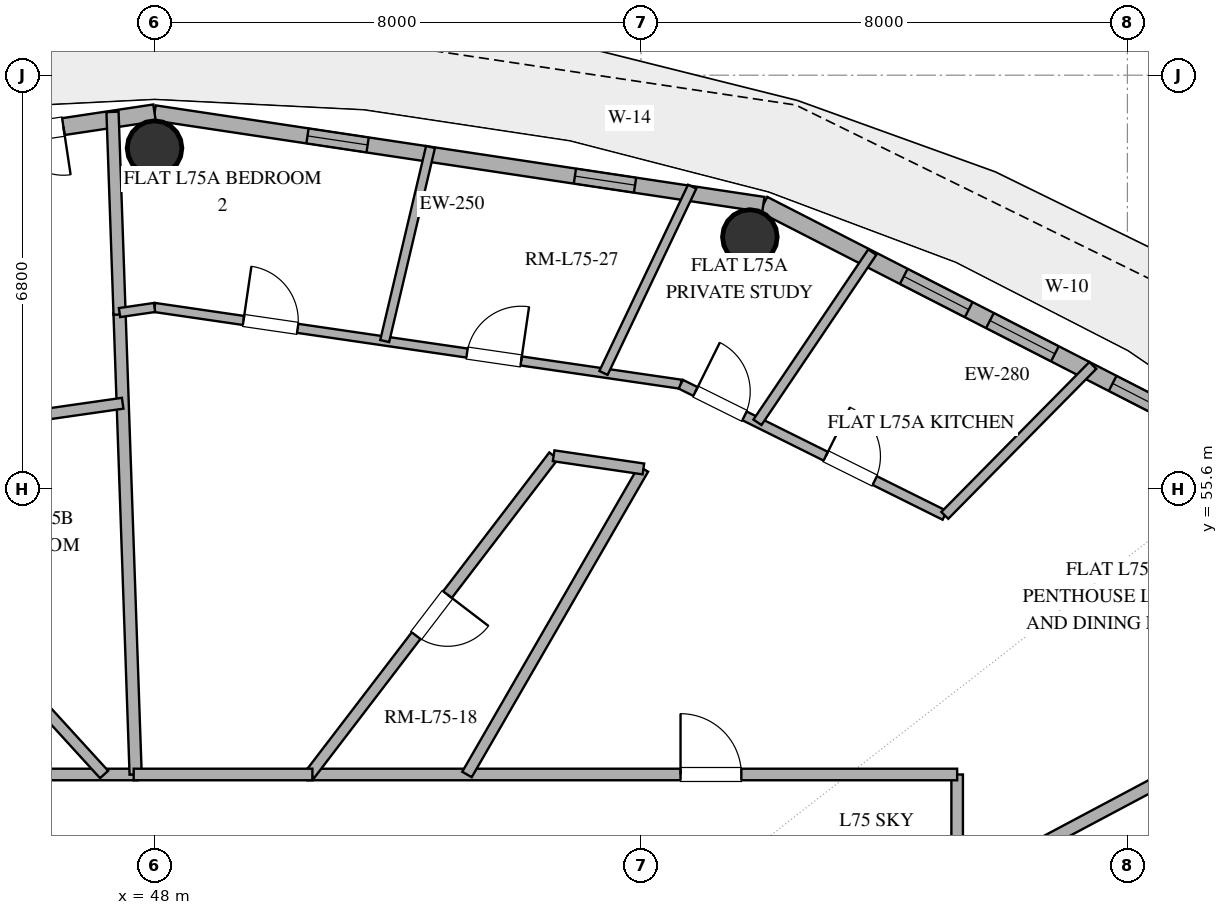
"""IFC4 building model, lengths in metres.
Left out: names, types, materials, properties, quantities, classifications, styles, units other than length and angle.
Written with IfcOpenShell. Run it as: python <this file> out.ifc"""

import sys

from ifc_helpers import new_model, si_unit, direction, frame, frame_2d, origin, origin_2d, place, context, subcontext, project, spatial, rectangle, hollow_circle, extrude, element, fill, save


model = new_model("IFC4")
c1 = context("Model", 3, precision=1e-05, world=origin(), true_north=direction((0.0, 1.0)))
c2 = subcontext(c1, "Body", "Model", "MODEL_VIEW")
j1 = project(units=[si_unit("LENGTHUNIT", "METRE"), si_unit("PLANEANGLEUNIT", "RADIAN")], contexts=[c1])
p1 = place(None, origin())
s1 = spatial("IfcSite", under=j1, at=p1, CompositionType="ELEMENT")
p2 = place(p1, origin())
s2 = spatial("IfcBuilding", under=s1, at=p2, CompositionType="ELEMENT")
p3 = place(p2, frame((0.0, 0.0, 291.0)))
s3 = spatial("IfcBuildingStorey", under=s2, at=p3, CompositionType="ELEMENT", Elevation=291.0)
for number, where, z_axis, x_axis in (
    (1, (57.791, 59.739, 0.0), (0.0, 0.0, 1.0), (1.0, 0.0, 0.0)),
    (2, (48.0, 61.2, 0.0), (0.0, 0.0, 1.0), (1.0, 0.0, 0.0)),
):
    element("IfcColumn", number, at=place(p3, frame(where, z_axis=z_axis, x_axis=x_axis)), inside=s3, PredefinedType="COLUMN", context=c2, shape_type="SweptSolid", body=[
        extrude(hollow_circle(Radius=0.45, WallThickness=0.025, at=origin_2d()), origin(), (0.0, 0.0, 1.0), 3.37),
    ])
p4 = place(p3, frame((66.383, 55.987, 0.0), z_axis=(0.0, 0.0, 1.0), x_axis=(-0.890007394051, 0.455946091699, 0.0)))
e3 = element("IfcWall", 3, at=p4, inside=s3, PredefinedType="SOLIDWALL", context=c2, shape_type="SweptSolid", body=[
    extrude(rectangle(XDim=9.404, YDim=0.28, at=frame_2d((4.702, 0.0))), origin(), (0.0, 0.0, 1.0), 3.37),
])
p5 = place(p4, frame((1.75, 0.0, 0.85)))
e4 = element("IfcOpeningElement", 4, at=p5, cuts=e3, PredefinedType="OPENING", context=c2, shape_type="SweptSolid", body=[
    extrude(rectangle(XDim=1.2, YDim=1.8, at=frame_2d((0.6, 0.9))), frame((0.0, 0.15, 0.0), z_axis=(0.0, -1.0, 0.0), x_axis=(1.0, 0.0, 0.0)), (0.0, 0.0, 1.0), 0.3),
])
p6 = place(p4, frame((4.017, 0.0, 0.85)))
e5 = element("IfcOpeningElement", 5, at=p6, cuts=e3, PredefinedType="OPENING", context=c2, shape_type="SweptSolid", body=[
    extrude(rectangle(XDim=1.2, YDim=1.6, at=frame_2d((0.6, 0.8))), frame((0.0, 0.15, 0.0), z_axis=(0.0, -1.0, 0.0), x_axis=(1.0, 0.0, 0.0)), (0.0, 0.0, 1.0), 0.3),
])
p7 = place(p4, frame((5.609, 0.0, 0.85)))
e6 = element("IfcOpeningElement", 6, at=p7, cuts=e3, PredefinedType="OPENING", context=c2, shape_type="SweptSolid", body=[
    extrude(rectangle(XDim=1.2, YDim=1.6, at=frame_2d((0.6, 0.8))), frame((0.0, 0.15, 0.0), z_axis=(0.0, -1.0, 0.0), x_axis=(1.0, 0.0, 0.0)), (0.0, 0.0, 1.0), 0.3),
])
p8 = place(p3, frame((58.013, 60.274, 0.0), z_axis=(0.0, 0.0, 1.0), x_axis=(-0.988882522213, 0.148698881169, 0.0)))
e7 = element("IfcWall", 7, at=p8, inside=s3, PredefinedType="SOLIDWALL", context=c2, shape_type="SweptSolid", body=[
    extrude(rectangle(XDim=10.125, YDim=0.25, at=frame_2d((5.062, 0.0))), origin(), (0.0, 0.0, 1.0), 3.37),
])
p9 = place(p8, frame((2.134, 0.0, 0.35)))
e8 = element("IfcOpeningElement", 8, at=p9, cuts=e7, PredefinedType="OPENING", context=c2, shape_type="SweptSolid", body=[
    extrude(rectangle(XDim=1.0, YDim=1.05, at=frame_2d((0.5, 0.525))), frame((0.0, 0.135, 0.0), z_axis=(0.0, -1.0, 0.0), x_axis=(1.0, 0.0, 0.0)), (0.0, 0.0, 1.0), 0.27),
])
p10 = place(p8, frame((6.582, 0.0, 1.42)))
e9 = element("IfcOpeningElement", 9, at=p10, cuts=e7, PredefinedType="OPENING", context=c2, shape_type="SweptSolid", body=[
    extrude(rectangle(XDim=1.0, YDim=1.05, at=frame_2d((0.5, 0.525))), frame((0.0, 0.135, 0.0), z_axis=(0.0, -1.0, 0.0), x_axis=(1.0, 0.0, 0.0)), (0.0, 0.0, 1.0), 0.27),
])
p11 = place(p3, frame((48.0, 61.78, 0.0), z_axis=(0.0, 0.0, 1.0), x_axis=(-0.988882522213, -0.148698881169, 0.0)))
e10 = element("IfcWall", 10, at=p11, inside=s3, PredefinedType="SOLIDWALL", context=c2, shape_type="SweptSolid", body=[
    extrude(rectangle(XDim=10.125, YDim=0.28, at=frame_2d((5.062, 0.0))), origin(), (0.0, 0.0, 1.0), 3.37),
])
p12 = place(p11, frame((1.516, 0.0, 0.0)))
e11 = element("IfcOpeningElement", 11, at=p12, cuts=e10, PredefinedType="OPENING", context=c2, shape_type="SweptSolid", body=[
    extrude(rectangle(XDim=1.6, YDim=2.25, at=frame_2d((0.8, 1.125))), frame((0.0, 0.15, 0.0), z_axis=(0.0, -1.0, 0.0), x_axis=(1.0, 0.0, 0.0)), (0.0, 0.0, 1.0), 0.3),
])
p13 = place(p3, frame((61.2, 50.9, 0.0), z_axis=(0.0, 0.0, 1.0), x_axis=(0.0, -1.0, 0.0)))
e12 = element("IfcWall", 12, at=p13, inside=s3, PredefinedType="PARTITIONING", context=c2, shape_type="SweptSolid", body=[
    extrude(rectangle(XDim=16.9, YDim=0.19, at=frame_2d((8.45, 0.0))), origin(), (0.0, 0.0, 1.0), 2.73),
])
p14 = place(p13, frame((8.873, 0.0, 0.0)))
e13 = element("IfcOpeningElement", 13, at=p14, cuts=e12, PredefinedType="OPENING", context=c2, shape_type="SweptSolid", body=[
    extrude(rectangle(XDim=1.0, YDim=2.2, at=frame_2d((0.5, 1.1))), frame((0.0, 0.105, 0.0), z_axis=(0.0, -1.0, 0.0), x_axis=(1.0, 0.0, 0.0)), (0.0, 0.0, 1.0), 0.21),
])
p15 = place(p3, frame((34.8, 50.9, 0.0), z_axis=(0.0, 0.0, 1.0), x_axis=(1.0, 0.0, 0.0)))
e14 = element("IfcWall", 14, at=p15, inside=s3, PredefinedType="PARTITIONING", context=c2, shape_type="SweptSolid", body=[
    extrude(rectangle(XDim=12.921, YDim=0.19, at=frame_2d((6.46, 0.0))), origin(), (0.0, 0.0, 1.0), 2.73),
])
p16 = place(p15, frame((5.707, 0.0, 0.0)))
e15 = element("IfcOpeningElement", 15, at=p16, cuts=e14, PredefinedType="OPENING", context=c2, shape_type="SweptSolid", body=[
    extrude(rectangle(XDim=1.0, YDim=2.2, at=frame_2d((0.5, 1.1))), frame((0.0, 0.105, 0.0), z_axis=(0.0, -1.0, 0.0), x_axis=(1.0, 0.0, 0.0)), (0.0, 0.0, 1.0), 0.21),
])
p17 = place(p3, frame((50.515, 50.9, 0.0), z_axis=(0.0, 0.0, 1.0), x_axis=(1.0, 0.0, 0.0)))
e16 = element("IfcWall", 16, at=p17, inside=s3, PredefinedType="PARTITIONING", context=c2, shape_type="SweptSolid", body=[
    extrude(rectangle(XDim=10.685, YDim=0.19, at=frame_2d((5.342, 0.0))), origin(), (0.0, 0.0, 1.0), 2.73),
])
p18 = place(p17, frame((6.135, 0.0, 0.0)))
e17 = element("IfcOpeningElement", 17, at=p18, cuts=e16, PredefinedType="OPENING", context=c2, shape_type="SweptSolid", body=[
    extrude(rectangle(XDim=1.0, YDim=2.2, at=frame_2d((0.5, 1.1))), frame((0.0, 0.105, 0.0), z_axis=(0.0, -1.0, 0.0), x_axis=(1.0, 0.0, 0.0)), (0.0, 0.0, 1.0), 0.21),
])
p19 = place(p3, frame((42.278, 56.261, 0.0), z_axis=(0.0, 0.0, 1.0), x_axis=(0.674096276867, -0.73864349284, 0.0)))
e18 = element("IfcWall", 18, at=p19, inside=s3, PredefinedType="PLUMBINGWALL", context=c2, shape_type="SweptSolid", body=[
    extrude(rectangle(XDim=7.258, YDim=0.18, at=frame_2d((3.629, 0.0))), origin(), (0.0, 0.0, 1.0), 2.73),
])
p20 = place(p19, frame((3.204, 0.0, 0.0)))
e19 = element("IfcOpeningElement", 19, at=p20, cuts=e18, PredefinedType="OPENING", context=c2, shape_type="SweptSolid", body=[
    extrude(rectangle(XDim=0.85, YDim=2.1, at=frame_2d((0.425, 1.05))), frame((0.0, 0.1, 0.0), z_axis=(0.0, -1.0, 0.0), x_axis=(1.0, 0.0, 0.0)), (0.0, 0.0, 1.0), 0.2),
])
p21 = place(p3, frame((54.564, 56.141, 0.0), z_axis=(0.0, 0.0, 1.0), x_axis=(-0.607456974677, -0.794352581614, 0.0)))
e20 = element("IfcWall", 20, at=p21, inside=s3, PredefinedType="PLUMBINGWALL", context=c2, shape_type="SweptSolid", body=[
    extrude(rectangle(XDim=6.598, YDim=0.18, at=frame_2d((3.299, 0.0))), origin(), (0.0, 0.0, 1.0), 2.73),
])
p22 = place(p21, frame((2.874, 0.0, 0.0)))
e21 = element("IfcOpeningElement", 21, at=p22, cuts=e20, PredefinedType="OPENING", context=c2, shape_type="SweptSolid", body=[
    extrude(rectangle(XDim=0.85, YDim=2.1, at=frame_2d((0.425, 1.05))), frame((0.0, 0.1, 0.0), z_axis=(0.0, -1.0, 0.0), x_axis=(1.0, 0.0, 0.0)), (0.0, 0.0, 1.0), 0.2),
])
p23 = place(p3, frame((47.689, 50.9, 0.0), z_axis=(0.0, 0.0, 1.0), x_axis=(-0.034882659784, 0.999391414835, 0.0)))
e22 = element("IfcWall", 22, at=p23, inside=s3, PredefinedType="PARTITIONING", context=c2, shape_type="SweptSolid", body=[
    extrude(rectangle(XDim=7.601, YDim=0.2, at=frame_2d((3.8, 0.0))), origin(), (0.0, 0.0, 1.0), 2.73),
])
p24 = place(p3, frame((53.138, 50.9, 0.0), z_axis=(0.0, 0.0, 1.0), x_axis=(0.499985927882, 0.866033528173, 0.0)))
e23 = element("IfcWall", 23, at=p24, inside=s3, PredefinedType="PLUMBINGWALL", context=c2, shape_type="SweptSolid", body=[
    extrude(rectangle(XDim=5.802, YDim=0.18, at=frame_2d((2.901, 0.0))), origin(), (0.0, 0.0, 1.0), 2.73),
])
p25 = place(p3, frame((68.909, 53.118, 0.0), z_axis=(0.0, 0.0, 1.0), x_axis=(-0.882939716422, -0.469486375909, 0.0)))
e24 = element("IfcWall", 24, at=p25, inside=s3, PredefinedType="PARTITIONING", context=c2, shape_type="SweptSolid", body=[
    extrude(rectangle(XDim=8.732, YDim=0.2, at=frame_2d((4.366, 0.0))), origin(), (0.0, 0.0, 1.0), 2.73),
])
p26 = place(p3, frame((47.476, 57.005, 0.0), z_axis=(0.0, 0.0, 1.0), x_axis=(-0.989922511169, -0.141610105153, 0.0)))
e25 = element("IfcWall", 25, at=p26, inside=s3, PredefinedType="PLUMBINGWALL", context=c2, shape_type="SweptSolid", body=[
    extrude(rectangle(XDim=5.251, YDim=0.18, at=frame_2d((2.626, 0.0))), origin(), (0.0, 0.0, 1.0), 2.73),
])
p27 = place(p3, frame((48.0, 58.58, 0.0), z_axis=(0.0, 0.0, 1.0), x_axis=(0.989536136377, -0.144285254977, 0.0)))
e26 = element("IfcWall", 26, at=p27, inside=s3, PredefinedType="PARTITIONING", context=c2, shape_type="SweptSolid", body=[
    extrude(rectangle(XDim=8.746, YDim=0.15, at=frame_2d((4.373, 0.0))), origin(), (0.0, 0.0, 1.0), 2.73),
])
p28 = place(p27, frame((1.479, 0.0, 0.0)))
e27 = element("IfcOpeningElement", 27, at=p28, cuts=e26, PredefinedType="OPENING", context=c2, shape_type="SweptSolid", body=[
    extrude(rectangle(XDim=0.9, YDim=2.1, at=frame_2d((0.45, 1.05))), frame((0.0, 0.085, 0.0), z_axis=(0.0, -1.0, 0.0), x_axis=(1.0, 0.0, 0.0)), (0.0, 0.0, 1.0), 0.17),
])
p29 = place(p27, frame((5.193, 0.0, 0.0)))
e28 = element("IfcOpeningElement", 28, at=p29, cuts=e26, PredefinedType="OPENING", context=c2, shape_type="SweptSolid", body=[
    extrude(rectangle(XDim=0.9, YDim=2.1, at=frame_2d((0.45, 1.05))), frame((0.0, 0.085, 0.0), z_axis=(0.0, -1.0, 0.0), x_axis=(1.0, 0.0, 0.0)), (0.0, 0.0, 1.0), 0.17),
])
p30 = place(p3, frame((56.655, 57.318, 0.0), z_axis=(0.0, 0.0, 1.0), x_axis=(0.895572412961, -0.44491578208, 0.0)))
e29 = element("IfcWall", 29, at=p30, inside=s3, PredefinedType="PLUMBINGWALL", context=c2, shape_type="SweptSolid", body=[
    extrude(rectangle(XDim=4.848, YDim=0.16, at=frame_2d((2.424, 0.0))), origin(), (0.0, 0.0, 1.0), 2.73),
])
p31 = place(p30, frame((2.662, 0.0, 0.0)))
e30 = element("IfcOpeningElement", 30, at=p31, cuts=e29, PredefinedType="OPENING", context=c2, shape_type="SweptSolid", body=[
    extrude(rectangle(XDim=0.9, YDim=2.1, at=frame_2d((0.45, 1.05))), frame((0.0, 0.09, 0.0), z_axis=(0.0, -1.0, 0.0), x_axis=(1.0, 0.0, 0.0)), (0.0, 0.0, 1.0), 0.18),
])
p32 = place(p30, frame((0.27, 0.0, 0.0)))
e31 = element("IfcOpeningElement", 31, at=p32, cuts=e29, PredefinedType="OPENING", context=c2, shape_type="SweptSolid", body=[
    extrude(rectangle(XDim=0.9, YDim=2.1, at=frame_2d((0.45, 1.05))), frame((0.0, 0.09, 0.0), z_axis=(0.0, -1.0, 0.0), x_axis=(1.0, 0.0, 0.0)), (0.0, 0.0, 1.0), 0.18),
])
p33 = place(p3, frame((60.997, 55.161, 0.0), z_axis=(0.0, 0.0, 1.0), x_axis=(0.702618919802, 0.711566338113, 0.0)))
e32 = element("IfcWall", 32, at=p33, inside=s3, PredefinedType="PLUMBINGWALL", context=c2, shape_type="SweptSolid", body=[
    extrude(rectangle(XDim=3.465, YDim=0.16, at=frame_2d((1.733, 0.0))), origin(), (0.0, 0.0, 1.0), 2.73),
])
p34 = place(p3, frame((56.842, 60.566, 0.0), z_axis=(0.0, 0.0, 1.0), x_axis=(-0.429975480416, -0.902840565239, 0.0)))
e33 = element("IfcWall", 33, at=p34, inside=s3, PredefinedType="PARTITIONING", context=c2, shape_type="SweptSolid", body=[
    extrude(rectangle(XDim=3.393, YDim=0.15, at=frame_2d((1.696, 0.0))), origin(), (0.0, 0.0, 1.0), 2.73),
])
p35 = place(p3, frame((59.804, 59.49, 0.0), z_axis=(0.0, 0.0, 1.0), x_axis=(-0.559397095435, -0.828899806743, 0.0)))
e34 = element("IfcWall", 34, at=p35, inside=s3, PredefinedType="PLUMBINGWALL", context=c2, shape_type="SweptSolid", body=[
    extrude(rectangle(XDim=3.376, YDim=0.16, at=frame_2d((1.688, 0.0))), origin(), (0.0, 0.0, 1.0), 2.73),
])
p36 = place(p3, frame((47.309, 61.797, 0.0), z_axis=(0.0, 0.0, 1.0), x_axis=(0.034921182562, -0.999390069497, 0.0)))
e35 = element("IfcWall", 35, at=p36, inside=s3, PredefinedType="PARTITIONING", context=c2, shape_type="SweptSolid", body=[
    extrude(rectangle(XDim=3.335, YDim=0.2, at=frame_2d((1.667, 0.0))), origin(), (0.0, 0.0, 1.0), 2.73),
])
p37 = place(p3, frame((51.785, 58.028, 0.0), z_axis=(0.0, 0.0, 1.0), x_axis=(0.2298279545, 0.973231273301, 0.0)))
e36 = element("IfcWall", 36, at=p37, inside=s3, PredefinedType="PARTITIONING", context=c2, shape_type="SweptSolid", body=[
    extrude(rectangle(XDim=3.278, YDim=0.15, at=frame_2d((1.639, 0.0))), origin(), (0.0, 0.0, 1.0), 2.73),
])
p38 = place(p3, frame((47.657, 50.9, 0.0), z_axis=(0.0, 0.0, 1.0), x_axis=(1.0, 0.0, 0.0)))
e37 = element("IfcWall", 37, at=p38, inside=s3, PredefinedType="PARTITIONING", context=c2, shape_type="SweptSolid", body=[
    extrude(rectangle(XDim=2.939, YDim=0.19, at=frame_2d((1.469, 0.0))), origin(), (0.0, 0.0, 1.0), 2.73),
])
p39 = place(p3, frame((56.039, 55.925, 0.0), z_axis=(0.0, 0.0, 1.0), x_axis=(-0.989402061703, 0.14520179165, 0.0)))
e38 = element("IfcWall", 38, at=p39, inside=s3, PredefinedType="PLUMBINGWALL", context=c2, shape_type="SweptSolid", body=[
    extrude(rectangle(XDim=1.491, YDim=0.18, at=frame_2d((0.746, 0.0))), origin(), (0.0, 0.0, 1.0), 2.73),
])
p40 = place(p3, frame((47.424, 58.496, 0.0), z_axis=(0.0, 0.0, 1.0), x_axis=(0.989534228924, 0.144298336053, 0.0)))
e39 = element("IfcWall", 39, at=p40, inside=s3, PredefinedType="PARTITIONING", context=c2, shape_type="SweptSolid", body=[
    extrude(rectangle(XDim=0.582, YDim=0.15, at=frame_2d((0.291, 0.0))), origin(), (0.0, 0.0, 1.0), 2.73),
])
p41 = place(p5, origin())
e40 = element("IfcWindow", 40, at=p41, inside=s3, PartitioningType="SINGLE_PANEL", PredefinedType="WINDOW", context=c2, shape_type="SweptSolid", body=[
    extrude(rectangle(XDim=1.2, YDim=1.8, at=frame_2d((0.6, 0.9))), frame((0.0, 0.03, 0.0), z_axis=(0.0, -1.0, 0.0), x_axis=(1.0, 0.0, 0.0)), (0.0, 0.0, 1.0), 0.06),
])
fill(e4, e40)
p42 = place(p6, origin())
e41 = element("IfcWindow", 41, at=p42, inside=s3, PartitioningType="SINGLE_PANEL", PredefinedType="WINDOW", context=c2, shape_type="SweptSolid", body=[
    extrude(rectangle(XDim=1.2, YDim=1.6, at=frame_2d((0.6, 0.8))), frame((0.0, 0.03, 0.0), z_axis=(0.0, -1.0, 0.0), x_axis=(1.0, 0.0, 0.0)), (0.0, 0.0, 1.0), 0.06),
])
fill(e5, e41)
p43 = place(p7, origin())
e42 = element("IfcWindow", 42, at=p43, inside=s3, PartitioningType="SINGLE_PANEL", PredefinedType="WINDOW", context=c2, shape_type="SweptSolid", body=[
    extrude(rectangle(XDim=1.2, YDim=1.6, at=frame_2d((0.6, 0.8))), frame((0.0, 0.03, 0.0), z_axis=(0.0, -1.0, 0.0), x_axis=(1.0, 0.0, 0.0)), (0.0, 0.0, 1.0), 0.06),
])
fill(e6, e42)
p44 = place(p12, origin())
e43 = element("IfcDoor", 43, at=p44, inside=s3, OperationType="DOUBLE_DOOR_SINGLE_SWING", PredefinedType="DOOR", context=c2, shape_type="SweptSolid", body=[
    extrude(rectangle(XDim=1.6, YDim=2.25, at=frame_2d((0.8, 1.125))), frame((0.0, 0.025, 0.0), z_axis=(0.0, -1.0, 0.0), x_axis=(1.0, 0.0, 0.0)), (0.0, 0.0, 1.0), 0.05),
])
fill(e11, e43)
p45 = place(p9, origin())
e44 = element("IfcWindow", 44, at=p45, inside=s3, PartitioningType="SINGLE_PANEL", PredefinedType="WINDOW", context=c2, shape_type="SweptSolid", body=[
    extrude(rectangle(XDim=1.0, YDim=1.05, at=frame_2d((0.5, 0.525))), frame((0.0, 0.03, 0.0), z_axis=(0.0, -1.0, 0.0), x_axis=(1.0, 0.0, 0.0)), (0.0, 0.0, 1.0), 0.06),
])
fill(e8, e44)
p46 = place(p10, origin())
e45 = element("IfcWindow", 45, at=p46, inside=s3, PartitioningType="SINGLE_PANEL", PredefinedType="WINDOW", context=c2, shape_type="SweptSolid", body=[
    extrude(rectangle(XDim=1.0, YDim=1.05, at=frame_2d((0.5, 0.525))), frame((0.0, 0.03, 0.0), z_axis=(0.0, -1.0, 0.0), x_axis=(1.0, 0.0, 0.0)), (0.0, 0.0, 1.0), 0.06),
])
fill(e9, e45)
p47 = place(p18, origin())
e46 = element("IfcDoor", 46, at=p47, inside=s3, OperationType="SINGLE_SWING_LEFT", PredefinedType="DOOR", context=c2, shape_type="SweptSolid", body=[
    extrude(rectangle(XDim=1.0, YDim=2.2, at=frame_2d((0.5, 1.1))), frame((0.0, 0.025, 0.0), z_axis=(0.0, -1.0, 0.0), x_axis=(1.0, 0.0, 0.0)), (0.0, 0.0, 1.0), 0.05),
])
fill(e17, e46)
p48 = place(p22, origin())
e47 = element("IfcDoor", 47, at=p48, inside=s3, OperationType="SINGLE_SWING_LEFT", PredefinedType="DOOR", context=c2, shape_type="SweptSolid", body=[
    extrude(rectangle(XDim=0.85, YDim=2.1, at=frame_2d((0.425, 1.05))), frame((0.0, 0.025, 0.0), z_axis=(0.0, -1.0, 0.0), x_axis=(1.0, 0.0, 0.0)), (0.0, 0.0, 1.0), 0.05),
])
fill(e21, e47)
p49 = place(p28, origin())
e48 = element("IfcDoor", 48, at=p49, inside=s3, OperationType="SINGLE_SWING_LEFT", PredefinedType="DOOR", context=c2, shape_type="SweptSolid", body=[
    extrude(rectangle(XDim=0.9, YDim=2.1, at=frame_2d((0.45, 1.05))), frame((0.0, 0.025, 0.0), z_axis=(0.0, -1.0, 0.0), x_axis=(1.0, 0.0, 0.0)), (0.0, 0.0, 1.0), 0.05),
])
fill(e27, e48)
p50 = place(p29, origin())
e49 = element("IfcDoor", 49, at=p50, inside=s3, OperationType="SINGLE_SWING_RIGHT", PredefinedType="DOOR", context=c2, shape_type="SweptSolid", body=[
    extrude(rectangle(XDim=0.9, YDim=2.1, at=frame_2d((0.45, 1.05))), frame((0.0, 0.025, 0.0), z_axis=(0.0, -1.0, 0.0), x_axis=(1.0, 0.0, 0.0)), (0.0, 0.0, 1.0), 0.05),
])
fill(e28, e49)
p51 = place(p31, origin())
e50 = element("IfcDoor", 50, at=p51, inside=s3, OperationType="SINGLE_SWING_LEFT", PredefinedType="DOOR", context=c2, shape_type="SweptSolid", body=[
    extrude(rectangle(XDim=0.9, YDim=2.1, at=frame_2d((0.45, 1.05))), frame((0.0, 0.025, 0.0), z_axis=(0.0, -1.0, 0.0), x_axis=(1.0, 0.0, 0.0)), (0.0, 0.0, 1.0), 0.05),
])
fill(e30, e50)
p52 = place(p32, origin())
e51 = element("IfcDoor", 51, at=p52, inside=s3, OperationType="SINGLE_SWING_LEFT", PredefinedType="DOOR", context=c2, shape_type="SweptSolid", body=[
    extrude(rectangle(XDim=0.9, YDim=2.1, at=frame_2d((0.45, 1.05))), frame((0.0, 0.025, 0.0), z_axis=(0.0, -1.0, 0.0), x_axis=(1.0, 0.0, 0.0)), (0.0, 0.0, 1.0), 0.05),
])
fill(e31, e51)
save(model, sys.argv[1])
